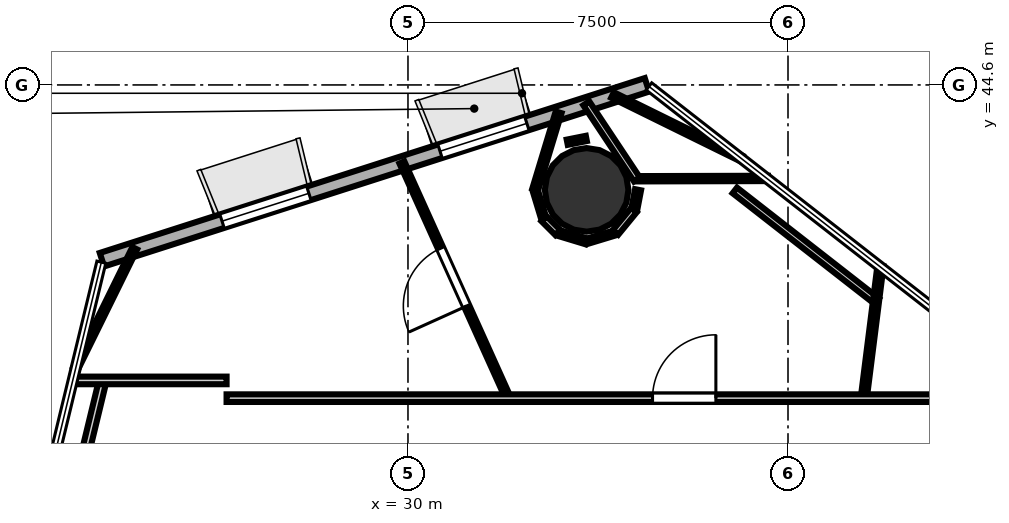
"""IFC4 building model, lengths in metres.
Left out: names, types, materials, properties, quantities, classifications, styles, units other than length and angle.
Written with IfcOpenShell. Run it as: python <this file> out.ifc"""

import sys

from ifc_helpers import new_model, si_unit, direction, frame, frame_2d, origin, origin_2d, place, context, subcontext, project, spatial, rectangle, hollow_circle, extrude, element, fill, save


model = new_model("IFC4")
c1 = context("Model", 3, precision=1e-05, world=origin(), true_north=direction((0.0, 1.0)))
c2 = subcontext(c1, "Body", "Model", "MODEL_VIEW")
j1 = project(units=[si_unit("LENGTHUNIT", "METRE"), si_unit("PLANEANGLEUNIT", "RADIAN")], contexts=[c1])
p1 = place(None, origin())
s1 = spatial("IfcSite", under=j1, at=p1, CompositionType="ELEMENT")
p2 = place(p1, origin())
s2 = spatial("IfcBuilding", under=s1, at=p2, CompositionType="ELEMENT")
p3 = place(p2, frame((0.0, 0.0, 85.8)))
s3 = spatial("IfcBuildingStorey", under=s2, at=p3, CompositionType="ELEMENT", Elevation=85.8)
p4 = place(p3, frame((33.526, 42.529, 0.0), z_axis=(0.0, 0.0, 1.0), x_axis=(1.0, 0.0, 0.0)))
e1 = element("IfcColumn", 1, at=p4, inside=s3, PredefinedType="COLUMN", context=c2, shape_type="SweptSolid", body=[
    extrude(hollow_circle(Radius=0.825, WallThickness=0.04, at=origin_2d()), origin(), (0.0, 0.0, 1.0), 3.7),
])
p5 = place(p3, frame((34.716, 44.602, 0.0), z_axis=(0.0, 0.0, 1.0), x_axis=(-0.952201794682, -0.305469707507, 0.0)))
e2 = element("IfcWall", 2, at=p5, inside=s3, PredefinedType="SOLIDWALL", context=c2, shape_type="SweptSolid", body=[
    extrude(rectangle(XDim=11.295, YDim=0.28, at=frame_2d((5.648, 0.0))), origin(), (0.0, 0.0, 1.0), 3.52),
])
p6 = place(p5, frame((2.489, 0.0, 0.85)))
e3 = element("IfcOpeningElement", 3, at=p6, cuts=e2, PredefinedType="OPENING", context=c2, shape_type="SweptSolid", body=[
    extrude(rectangle(XDim=1.8, YDim=2.1, at=frame_2d((0.9, 1.05))), frame((0.0, 0.15, 0.0), z_axis=(0.0, -1.0, 0.0), x_axis=(1.0, 0.0, 0.0)), (0.0, 0.0, 1.0), 0.3),
])
p7 = place(p5, frame((7.007, 0.0, 0.85)))
e4 = element("IfcOpeningElement", 4, at=p7, cuts=e2, PredefinedType="OPENING", context=c2, shape_type="SweptSolid", body=[
    extrude(rectangle(XDim=1.8, YDim=2.1, at=frame_2d((0.9, 1.05))), frame((0.0, 0.15, 0.0), z_axis=(0.0, -1.0, 0.0), x_axis=(1.0, 0.0, 0.0)), (0.0, 0.0, 1.0), 0.3),
])
p8 = place(p3, frame((23.58, 37.13, 0.0), z_axis=(0.0, 0.0, 1.0), x_axis=(0.235175234571, 0.971952987055, 0.0)))
e5 = element("IfcWall", 5, at=p8, inside=s3, PredefinedType="PARTITIONING", context=c2, shape_type="SweptSolid", body=[
    extrude(rectangle(XDim=1.711, YDim=0.15, at=frame_2d((0.855, 0.0))), origin(), (0.0, 0.0, 1.0), 2.84),
])
p9 = place(p3, frame((23.364, 38.769, 0.0), z_axis=(0.0, 0.0, 1.0), x_axis=(1.0, 0.0, 0.0)))
e6 = element("IfcWall", 6, at=p9, inside=s3, PredefinedType="PARTITIONING", context=c2, shape_type="SweptSolid", body=[
    extrude(rectangle(XDim=3.056, YDim=0.15, at=frame_2d((1.528, 0.0))), origin(), (0.0, 0.0, 1.0), 2.84),
])
p10 = place(p3, frame((26.42, 38.419, 0.0), z_axis=(0.0, 0.0, 1.0), x_axis=(1.0, 0.0, 0.0)))
e7 = element("IfcWall", 7, at=p10, inside=s3, PredefinedType="PARTITIONING", context=c2, shape_type="SweptSolid", body=[
    extrude(rectangle(XDim=16.243, YDim=0.15, at=frame_2d((8.122, 0.0))), origin(), (0.0, 0.0, 1.0), 2.798),
])
p11 = place(p10, frame((8.406, 0.0, 0.0)))
e8 = element("IfcOpeningElement", 8, at=p11, cuts=e7, PredefinedType="OPENING", context=c2, shape_type="SweptSolid", body=[
    extrude(rectangle(XDim=1.25, YDim=2.2, at=frame_2d((0.625, 1.1))), frame((0.0, 0.085, 0.0), z_axis=(0.0, -1.0, 0.0), x_axis=(1.0, 0.0, 0.0)), (0.0, 0.0, 1.0), 0.17),
])
p12 = place(p3, frame((42.398, 38.634, 0.0), z_axis=(0.0, 0.0, 1.0), x_axis=(-0.802766662885, -0.596293287704, 0.0)))
e9 = element("IfcWall", 9, at=p12, inside=s3, PredefinedType="PARTITIONING", context=c2, shape_type="SweptSolid", body=[
    extrude(rectangle(XDim=3.22, YDim=0.15, at=frame_2d((1.61, 0.0))), origin(), (0.0, 0.0, 1.0), 2.798),
])
p13 = place(p3, frame((43.629, 37.65, 0.0), z_axis=(0.0, 0.0, 1.0), x_axis=(-0.970941159408, -0.239318333958, 0.0)))
e10 = element("IfcWall", 10, at=p13, inside=s3, PredefinedType="PARTITIONING", context=c2, shape_type="SweptSolid", body=[
    extrude(rectangle(XDim=3.715, YDim=0.14, at=frame_2d((1.858, 0.0))), origin(), (0.0, 0.0, 1.0), 2.798),
])
p14 = place(p3, frame((31.923, 38.543, 0.0), z_axis=(0.0, 0.0, 1.0), x_axis=(-0.411157401185, 0.911564364952, 0.0)))
e11 = element("IfcWall", 11, at=p14, inside=s3, PredefinedType="PARTITIONING", context=c2, shape_type="SweptSolid", body=[
    extrude(rectangle(XDim=4.968, YDim=0.105, at=frame_2d((2.484, 0.0))), origin(), (0.0, 0.0, 1.0), 2.798),
])
p15 = place(p14, frame((1.859, 0.0, 0.0)))
e12 = element("IfcOpeningElement", 12, at=p15, cuts=e11, PredefinedType="OPENING", context=c2, shape_type="SweptSolid", body=[
    extrude(rectangle(XDim=1.25, YDim=2.2, at=frame_2d((0.625, 1.1))), frame((0.0, 0.062, 0.0), z_axis=(0.0, -1.0, 0.0), x_axis=(1.0, 0.0, 0.0)), (0.0, 0.0, 1.0), 0.125),
])
p16 = place(p3, frame((34.037, 44.401, 0.0), z_axis=(0.0, 0.0, 1.0), x_axis=(0.897239578462, -0.441544039526, 0.0)))
e13 = element("IfcWall", 13, at=p16, inside=s3, PredefinedType="PARTITIONING", context=c2, shape_type="SweptSolid", body=[
    extrude(rectangle(XDim=2.829, YDim=0.12, at=frame_2d((1.415, 0.0))), origin(), (0.0, 0.0, 1.0), 2.84),
])
p17 = place(p3, frame((37.104, 42.755, 0.0), z_axis=(0.0, 0.0, 1.0), x_axis=(-0.999996813354, -0.002524536135, 0.0)))
e14 = element("IfcWall", 14, at=p17, inside=s3, PredefinedType="PARTITIONING", context=c2, shape_type="SweptSolid", body=[
    extrude(rectangle(XDim=2.611, YDim=0.105, at=frame_2d((1.306, 0.0))), origin(), (0.0, 0.0, 1.0), 2.84),
])
p18 = place(p3, frame((34.518, 42.735, 0.0), z_axis=(0.0, 0.0, 1.0), x_axis=(-0.553607257013, 0.832777884542, 0.0)))
e15 = element("IfcWall", 15, at=p18, inside=s3, PredefinedType="PARTITIONING", context=c2, shape_type="SweptSolid", body=[
    extrude(rectangle(XDim=1.805, YDim=0.14, at=frame_2d((0.902, 0.0))), origin(), (0.0, 0.0, 1.0), 2.84),
])
p19 = place(p3, frame((33.52, 43.544, 0.0), z_axis=(0.0, 0.0, 1.0), x_axis=(-0.980799947725, -0.195016569917, 0.0)))
e16 = element("IfcWall", 16, at=p19, inside=s3, PredefinedType="PARTITIONING", context=c2, shape_type="SweptSolid", body=[
    extrude(rectangle(XDim=0.384, YDim=0.105, at=frame_2d((0.192, 0.0))), origin(), (0.0, 0.0, 1.0), 2.84),
])
p20 = place(p3, frame((32.973, 44.06, 0.0), z_axis=(0.0, 0.0, 1.0), x_axis=(-0.29031843557, -0.956930094609, 0.0)))
e17 = element("IfcWall", 17, at=p20, inside=s3, PredefinedType="PARTITIONING", context=c2, shape_type="SweptSolid", body=[
    extrude(rectangle(XDim=1.59, YDim=0.12, at=frame_2d((0.795, 0.0))), origin(), (0.0, 0.0, 1.0), 2.84),
])
p21 = place(p3, frame((32.511, 42.52, 0.0), z_axis=(0.0, 0.0, 1.0), x_axis=(0.290362912899, -0.956916599716, 0.0)))
e18 = element("IfcWall", 18, at=p21, inside=s3, PredefinedType="PARTITIONING", context=c2, shape_type="SweptSolid", body=[
    extrude(rectangle(XDim=0.572, YDim=0.105, at=frame_2d((0.286, 0.0))), origin(), (0.0, 0.0, 1.0), 2.84),
])
p22 = place(p3, frame((32.685, 41.96, 0.0), z_axis=(0.0, 0.0, 1.0), x_axis=(0.707106781187, -0.707106781187, 0.0)))
e19 = element("IfcWall", 19, at=p22, inside=s3, PredefinedType="PARTITIONING", context=c2, shape_type="SweptSolid", body=[
    extrude(rectangle(XDim=0.384, YDim=0.14, at=frame_2d((0.192, 0.0))), origin(), (0.0, 0.0, 1.0), 2.798),
])
p23 = place(p3, frame((32.97, 41.68, 0.0), z_axis=(0.0, 0.0, 1.0), x_axis=(0.956952578659, -0.290244314669, 0.0)))
e20 = element("IfcWall", 20, at=p23, inside=s3, PredefinedType="PARTITIONING", context=c2, shape_type="SweptSolid", body=[
    extrude(rectangle(XDim=0.572, YDim=0.12, at=frame_2d((0.286, 0.0))), origin(), (0.0, 0.0, 1.0), 2.798),
])
p24 = place(p3, frame((33.535, 41.514, 0.0), z_axis=(0.0, 0.0, 1.0), x_axis=(0.956952578659, 0.290244314669, 0.0)))
e21 = element("IfcWall", 21, at=p24, inside=s3, PredefinedType="PARTITIONING", context=c2, shape_type="SweptSolid", body=[
    extrude(rectangle(XDim=0.572, YDim=0.105, at=frame_2d((0.286, 0.0))), origin(), (0.0, 0.0, 1.0), 2.84),
])
p25 = place(p3, frame((34.097, 41.69, 0.0), z_axis=(0.0, 0.0, 1.0), x_axis=(0.634329694458, 0.773062635709, 0.0)))
e22 = element("IfcWall", 22, at=p25, inside=s3, PredefinedType="PARTITIONING", context=c2, shape_type="SweptSolid", body=[
    extrude(rectangle(XDim=0.572, YDim=0.14, at=frame_2d((0.286, 0.0))), origin(), (0.0, 0.0, 1.0), 2.798),
])
p26 = place(p3, frame((34.467, 42.146, 0.0), z_axis=(0.0, 0.0, 1.0), x_axis=(0.188455212737, 0.982081785185, 0.0)))
e23 = element("IfcWall", 23, at=p26, inside=s3, PredefinedType="PARTITIONING", context=c2, shape_type="SweptSolid", body=[
    extrude(rectangle(XDim=0.393, YDim=0.12, at=frame_2d((0.196, 0.0))), origin(), (0.0, 0.0, 1.0), 2.84),
])
p27 = place(p3, frame((36.451, 42.518, 0.0), z_axis=(0.0, 0.0, 1.0), x_axis=(0.78849297464, -0.615043761812, 0.0)))
e24 = element("IfcWall", 24, at=p27, inside=s3, PredefinedType="PARTITIONING", context=c2, shape_type="SweptSolid", body=[
    extrude(rectangle(XDim=3.553, YDim=0.14, at=frame_2d((1.776, 0.0))), origin(), (0.0, 0.0, 1.0), 2.84),
])
p28 = place(p3, frame((39.325, 41.029, 0.0), z_axis=(0.0, 0.0, 1.0), x_axis=(-0.125337063775, -0.992114217439, 0.0)))
e25 = element("IfcWall", 25, at=p28, inside=s3, PredefinedType="PARTITIONING", context=c2, shape_type="SweptSolid", body=[
    extrude(rectangle(XDim=2.515, YDim=0.12, at=frame_2d((1.257, 0.0))), origin(), (0.0, 0.0, 1.0), 2.798),
])
p29 = place(p3, frame((23.442, 39.008, 0.0), z_axis=(0.0, 0.0, 1.0), x_axis=(0.441507651219, 0.897257484736, 0.0)))
e26 = element("IfcWall", 26, at=p29, inside=s3, PredefinedType="PARTITIONING", context=c2, shape_type="SweptSolid", body=[
    extrude(rectangle(XDim=2.64, YDim=0.105, at=frame_2d((1.32, 0.0))), origin(), (0.0, 0.0, 1.0), 2.84),
])
p30 = place(p11, origin())
e27 = element("IfcDoor", 27, at=p30, inside=s3, OperationType="SINGLE_SWING_RIGHT", PredefinedType="DOOR", context=c2, shape_type="SweptSolid", body=[
    extrude(rectangle(XDim=1.25, YDim=2.2, at=frame_2d((0.625, 1.1))), frame((0.0, 0.025, 0.0), z_axis=(0.0, -1.0, 0.0), x_axis=(1.0, 0.0, 0.0)), (0.0, 0.0, 1.0), 0.05),
])
fill(e8, e27)
p31 = place(p15, origin())
e28 = element("IfcDoor", 28, at=p31, inside=s3, OperationType="SINGLE_SWING_LEFT", PredefinedType="DOOR", context=c2, shape_type="SweptSolid", body=[
    extrude(rectangle(XDim=1.25, YDim=2.2, at=frame_2d((0.625, 1.1))), frame((0.0, 0.025, 0.0), z_axis=(0.0, -1.0, 0.0), x_axis=(1.0, 0.0, 0.0)), (0.0, 0.0, 1.0), 0.05),
])
fill(e12, e28)
p32 = place(p6, origin())
e29 = element("IfcWindow", 29, at=p32, inside=s3, PartitioningType="SINGLE_PANEL", PredefinedType="WINDOW", context=c2, shape_type="SweptSolid", body=[
    extrude(rectangle(XDim=1.8, YDim=2.1, at=frame_2d((0.9, 1.05))), frame((0.0, 0.03, 0.0), z_axis=(0.0, -1.0, 0.0), x_axis=(1.0, 0.0, 0.0)), (0.0, 0.0, 1.0), 0.06),
])
fill(e3, e29)
p33 = place(p7, origin())
e30 = element("IfcWindow", 30, at=p33, inside=s3, PartitioningType="SINGLE_PANEL", PredefinedType="WINDOW", context=c2, shape_type="SweptSolid", body=[
    extrude(rectangle(XDim=1.8, YDim=2.1, at=frame_2d((0.9, 1.05))), frame((0.0, 0.03, 0.0), z_axis=(0.0, -1.0, 0.0), x_axis=(1.0, 0.0, 0.0)), (0.0, 0.0, 1.0), 0.06),
])
fill(e4, e30)
save(model, sys.argv[1])
